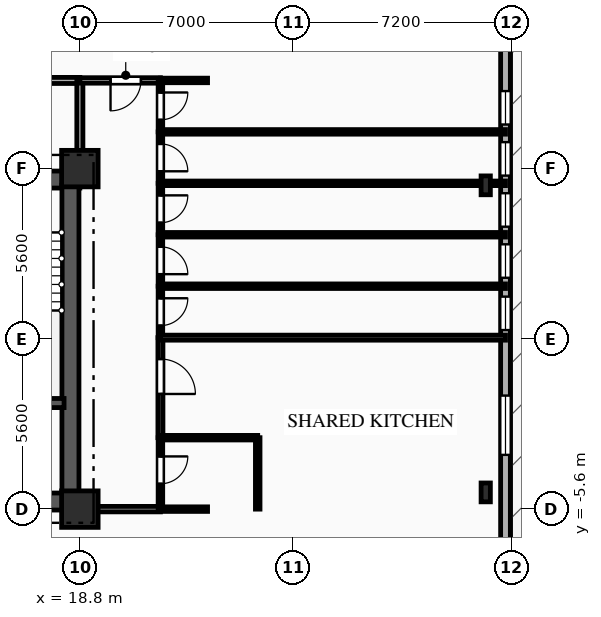
"""IFC4 building model, lengths in metres.
Left out: names, types, materials, properties, quantities, classifications, styles, units other than length and angle.
Written with IfcOpenShell. Run it as: python <this file> out.ifc"""

import sys

from ifc_helpers import new_model, si_unit, direction, frame, frame_2d, origin, origin_2d, place, context, subcontext, project, spatial, rectangle, i_section, extrude, element, fill, save


model = new_model("IFC4")
c1 = context("Model", 3, precision=1e-05, world=origin(), true_north=direction((0.0, 1.0)))
c2 = subcontext(c1, "Body", "Model", "MODEL_VIEW")
j1 = project(units=[si_unit("LENGTHUNIT", "METRE"), si_unit("PLANEANGLEUNIT", "RADIAN")], contexts=[c1])
p1 = place(None, origin())
s1 = spatial("IfcSite", under=j1, at=p1, CompositionType="ELEMENT")
p2 = place(p1, origin())
s2 = spatial("IfcBuilding", under=s1, at=p2, CompositionType="ELEMENT")
p3 = place(p2, frame((0.0, 0.0, 27.0)))
s3 = spatial("IfcBuildingStorey", under=s2, at=p3, CompositionType="ELEMENT", Elevation=27.0)
for number, where, z_axis, x_axis in (
    (1, (18.8, -5.6, 0.0), (0.0, 0.0, 1.0), (1.0, 0.0, 0.0)),
    (2, (18.8, 5.6, 0.0), (0.0, 0.0, 1.0), (1.0, 0.0, 0.0)),
):
    element("IfcColumn", number, at=place(p3, frame(where, z_axis=z_axis, x_axis=x_axis)), inside=s3, PredefinedType="COLUMN", context=c2, shape_type="SweptSolid", body=[
        extrude(rectangle(XDim=1.2, YDim=1.2, at=origin_2d()), origin(), (0.0, 0.0, 1.0), 3.35),
    ])
for number, where, z_axis, x_axis in (
    (3, (32.15, -5.05, 0.0), (0.0, 0.0, 1.0), (1.0, 0.0, 0.0)),
    (4, (32.15, 5.05, 0.0), (0.0, 0.0, 1.0), (1.0, 0.0, 0.0)),
):
    element("IfcColumn", number, at=place(p3, frame(where, z_axis=z_axis, x_axis=x_axis)), inside=s3, PredefinedType="COLUMN", context=c2, shape_type="SweptSolid", body=[
        extrude(i_section(OverallWidth=0.305, OverallDepth=0.62, WebThickness=0.021, FlangeThickness=0.04, FilletRadius=0.027, at=origin_2d()), origin(), (0.0, 0.0, 1.0), 3.35),
    ])
p4 = place(p3, frame((32.8, 15.8, 0.0), z_axis=(0.0, 0.0, 1.0), x_axis=(0.0, -1.0, 0.0)))
e5 = element("IfcWall", 5, at=p4, inside=s3, PredefinedType="SOLIDWALL", context=c2, shape_type="SweptSolid", body=[
    extrude(rectangle(XDim=31.6, YDim=0.32, at=frame_2d((15.8, 0.0))), origin(), (0.0, 0.0, 1.0), 3.035),
])
p5 = place(p4, frame((7.65, 0.0, 0.85)))
e6 = element("IfcOpeningElement", 6, at=p5, cuts=e5, PredefinedType="OPENING", context=c2, shape_type="SweptSolid", body=[
    extrude(rectangle(XDim=1.1, YDim=1.85, at=frame_2d((0.55, 0.925))), frame((0.0, 0.17, 0.0), z_axis=(0.0, -1.0, 0.0), x_axis=(1.0, 0.0, 0.0)), (0.0, 0.0, 1.0), 0.34),
])
p6 = place(p4, frame((9.33, 0.0, 0.85)))
e7 = element("IfcOpeningElement", 7, at=p6, cuts=e5, PredefinedType="OPENING", context=c2, shape_type="SweptSolid", body=[
    extrude(rectangle(XDim=1.1, YDim=1.85, at=frame_2d((0.55, 0.925))), frame((0.0, 0.17, 0.0), z_axis=(0.0, -1.0, 0.0), x_axis=(1.0, 0.0, 0.0)), (0.0, 0.0, 1.0), 0.34),
])
p7 = place(p4, frame((11.01, 0.0, 0.85)))
e8 = element("IfcOpeningElement", 8, at=p7, cuts=e5, PredefinedType="OPENING", context=c2, shape_type="SweptSolid", body=[
    extrude(rectangle(XDim=1.1, YDim=1.85, at=frame_2d((0.55, 0.925))), frame((0.0, 0.17, 0.0), z_axis=(0.0, -1.0, 0.0), x_axis=(1.0, 0.0, 0.0)), (0.0, 0.0, 1.0), 0.34),
])
p8 = place(p4, frame((12.69, 0.0, 0.85)))
e9 = element("IfcOpeningElement", 9, at=p8, cuts=e5, PredefinedType="OPENING", context=c2, shape_type="SweptSolid", body=[
    extrude(rectangle(XDim=1.1, YDim=1.85, at=frame_2d((0.55, 0.925))), frame((0.0, 0.17, 0.0), z_axis=(0.0, -1.0, 0.0), x_axis=(1.0, 0.0, 0.0)), (0.0, 0.0, 1.0), 0.34),
])
p9 = place(p4, frame((14.41, 0.0, 0.85)))
e10 = element("IfcOpeningElement", 10, at=p9, cuts=e5, PredefinedType="OPENING", context=c2, shape_type="SweptSolid", body=[
    extrude(rectangle(XDim=1.1, YDim=1.85, at=frame_2d((0.55, 0.925))), frame((0.0, 0.17, 0.0), z_axis=(0.0, -1.0, 0.0), x_axis=(1.0, 0.0, 0.0)), (0.0, 0.0, 1.0), 0.34),
])
p10 = place(p4, frame((17.665, 0.0, 0.85)))
e11 = element("IfcOpeningElement", 11, at=p10, cuts=e5, PredefinedType="OPENING", context=c2, shape_type="SweptSolid", body=[
    extrude(rectangle(XDim=1.95, YDim=1.85, at=frame_2d((0.975, 0.925))), frame((0.0, 0.17, 0.0), z_axis=(0.0, -1.0, 0.0), x_axis=(1.0, 0.0, 0.0)), (0.0, 0.0, 1.0), 0.34),
])
p11 = place(p3, frame((9.2, 5.24, 0.0), z_axis=(0.0, 0.0, 1.0), x_axis=(1.0, 0.0, 0.0)))
e12 = element("IfcWall", 12, at=p11, inside=s3, PredefinedType="SHEAR", context=c2, shape_type="SweptSolid", body=[
    extrude(rectangle(XDim=9.6, YDim=0.56, at=frame_2d((4.8, 0.0))), origin(), (0.0, 0.0, 1.0), 3.035),
])
p12 = place(p11, frame((6.95, 0.0, 0.0)))
e13 = element("IfcOpeningElement", 13, at=p12, cuts=e12, PredefinedType="OPENING", context=c2, shape_type="SweptSolid", body=[
    extrude(rectangle(XDim=1.1, YDim=2.15, at=frame_2d((0.55, 1.075))), frame((0.0, 0.29, 0.0), z_axis=(0.0, -1.0, 0.0), x_axis=(1.0, 0.0, 0.0)), (0.0, 0.0, 1.0), 0.58),
])
p13 = place(p11, frame((3.775, 0.0, 0.0)))
e14 = element("IfcOpeningElement", 14, at=p13, cuts=e12, PredefinedType="OPENING", context=c2, shape_type="SweptSolid", body=[
    extrude(rectangle(XDim=1.05, YDim=2.1, at=frame_2d((0.525, 1.05))), frame((0.0, 0.29, 0.0), z_axis=(0.0, -1.0, 0.0), x_axis=(1.0, 0.0, 0.0)), (0.0, 0.0, 1.0), 0.58),
])
p14 = place(p3, frame((9.2, -5.35, 0.0), z_axis=(0.0, 0.0, 1.0), x_axis=(1.0, 0.0, 0.0)))
e15 = element("IfcWall", 15, at=p14, inside=s3, PredefinedType="SHEAR", context=c2, shape_type="SweptSolid", body=[
    extrude(rectangle(XDim=9.6, YDim=0.56, at=frame_2d((4.8, 0.0))), origin(), (0.0, 0.0, 1.0), 3.035),
])
p15 = place(p14, frame((7.65, 0.0, 0.0)))
e16 = element("IfcOpeningElement", 16, at=p15, cuts=e15, PredefinedType="OPENING", context=c2, shape_type="SweptSolid", body=[
    extrude(rectangle(XDim=0.9, YDim=2.1, at=frame_2d((0.45, 1.05))), frame((0.0, 0.29, 0.0), z_axis=(0.0, -1.0, 0.0), x_axis=(1.0, 0.0, 0.0)), (0.0, 0.0, 1.0), 0.58),
])
p16 = place(p3, frame((18.49, -5.05, 0.0), z_axis=(0.0, 0.0, 1.0), x_axis=(0.0, 1.0, 0.0)))
e17 = element("IfcWall", 17, at=p16, inside=s3, PredefinedType="SHEAR", context=c2, shape_type="SweptSolid", body=[
    extrude(rectangle(XDim=10.1, YDim=0.56, at=frame_2d((5.05, 0.0))), origin(), (0.0, 0.0, 1.0), 3.035),
])
p17 = place(p3, frame((15.1, -2.11, 0.0), z_axis=(0.0, 0.0, 1.0), x_axis=(1.0, 0.0, 0.0)))
e18 = element("IfcWall", 18, at=p17, inside=s3, PredefinedType="SHEAR", context=c2, shape_type="SweptSolid", body=[
    extrude(rectangle(XDim=3.18, YDim=0.3, at=frame_2d((1.59, 0.0))), origin(), (0.0, 0.0, 1.0), 3.035),
])
p18 = place(p3, frame((18.8, 8.5, 0.0), z_axis=(0.0, 0.0, 1.0), x_axis=(-1.0, 0.0, 0.0)))
e19 = element("IfcWall", 19, at=p18, inside=s3, PredefinedType="PARTITIONING", context=c2, shape_type="SweptSolid", body=[
    extrude(rectangle(XDim=6.8, YDim=0.2, at=frame_2d((3.4, 0.0))), origin(), (0.0, 0.0, 1.0), 3.035),
])
p19 = place(p18, frame((3.985, 0.0, 0.0)))
e20 = element("IfcOpeningElement", 20, at=p19, cuts=e19, PredefinedType="OPENING", context=c2, shape_type="SweptSolid", body=[
    extrude(rectangle(XDim=1.1, YDim=2.15, at=frame_2d((0.55, 1.075))), frame((0.0, 0.11, 0.0), z_axis=(0.0, -1.0, 0.0), x_axis=(1.0, 0.0, 0.0)), (0.0, 0.0, 1.0), 0.22),
])
p20 = place(p3, frame((18.8, 5.6, 0.0), z_axis=(0.0, 0.0, 1.0), x_axis=(0.0, 1.0, 0.0)))
e21 = element("IfcWall", 21, at=p20, inside=s3, PredefinedType="PARTITIONING", context=c2, shape_type="SweptSolid", body=[
    extrude(rectangle(XDim=2.9, YDim=0.2, at=frame_2d((1.45, 0.0))), origin(), (0.0, 0.0, 1.0), 2.52),
])
p21 = place(p3, frame((21.45, 8.5, 0.0), z_axis=(0.0, 0.0, 1.0), x_axis=(-1.0, 0.0, 0.0)))
e22 = element("IfcWall", 22, at=p21, inside=s3, PredefinedType="PARTITIONING", context=c2, shape_type="SweptSolid", body=[
    extrude(rectangle(XDim=2.65, YDim=0.18, at=frame_2d((1.325, 0.0))), origin(), (0.0, 0.0, 1.0), 3.035),
])
p22 = place(p21, frame((0.641, 0.0, 0.0)))
e23 = element("IfcOpeningElement", 23, at=p22, cuts=e22, PredefinedType="OPENING", context=c2, shape_type="SweptSolid", body=[
    extrude(rectangle(XDim=1.0, YDim=2.15, at=frame_2d((0.5, 1.075))), frame((0.0, 0.1, 0.0), z_axis=(0.0, -1.0, 0.0), x_axis=(1.0, 0.0, 0.0)), (0.0, 0.0, 1.0), 0.2),
])
p23 = place(p3, frame((23.0, 8.5, 0.0), z_axis=(0.0, 0.0, 1.0), x_axis=(-1.0, 0.0, 0.0)))
e24 = element("IfcWall", 24, at=p23, inside=s3, PredefinedType="PARTITIONING", context=c2, shape_type="SweptSolid", body=[
    extrude(rectangle(XDim=1.55, YDim=0.15, at=frame_2d((0.775, 0.0))), origin(), (0.0, 0.0, 1.0), 3.035),
])
p24 = place(p3, frame((18.8, -5.6, 0.0), z_axis=(0.0, 0.0, 1.0), x_axis=(1.0, 0.0, 0.0)))
e25 = element("IfcWall", 25, at=p24, inside=s3, PredefinedType="PARTITIONING", context=c2, shape_type="SweptSolid", body=[
    extrude(rectangle(XDim=2.65, YDim=0.18, at=frame_2d((1.325, 0.0))), origin(), (0.0, 0.0, 1.0), 3.035),
])
p25 = place(p3, frame((21.45, -5.6, 0.0), z_axis=(0.0, 0.0, 1.0), x_axis=(1.0, 0.0, 0.0)))
e26 = element("IfcWall", 26, at=p25, inside=s3, PredefinedType="PLUMBINGWALL", context=c2, shape_type="SweptSolid", body=[
    extrude(rectangle(XDim=1.55, YDim=0.15, at=frame_2d((0.775, 0.0))), origin(), (0.0, 0.0, 1.0), 3.035),
])
p26 = place(p3, frame((21.45, -3.25, 0.0), z_axis=(0.0, 0.0, 1.0), x_axis=(0.0, -1.0, 0.0)))
e27 = element("IfcWall", 27, at=p26, inside=s3, PredefinedType="PLUMBINGWALL", context=c2, shape_type="SweptSolid", body=[
    extrude(rectangle(XDim=2.35, YDim=0.15, at=frame_2d((1.175, 0.0))), origin(), (0.0, 0.0, 1.0), 3.035),
])
p27 = place(p26, frame((0.616, 0.0, 0.0)))
e28 = element("IfcOpeningElement", 28, at=p27, cuts=e27, PredefinedType="OPENING", context=c2, shape_type="SweptSolid", body=[
    extrude(rectangle(XDim=0.9, YDim=2.1, at=frame_2d((0.45, 1.05))), frame((0.0, 0.085, 0.0), z_axis=(0.0, -1.0, 0.0), x_axis=(1.0, 0.0, 0.0)), (0.0, 0.0, 1.0), 0.17),
])
p28 = place(p3, frame((21.45, 0.04, 0.0), z_axis=(0.0, 0.0, 1.0), x_axis=(0.0, -1.0, 0.0)))
e29 = element("IfcWall", 29, at=p28, inside=s3, PredefinedType="PARTITIONING", context=c2, shape_type="SweptSolid", body=[
    extrude(rectangle(XDim=3.29, YDim=0.165, at=frame_2d((1.645, 0.0))), origin(), (0.0, 0.0, 1.0), 3.035),
])
p29 = place(p28, frame((0.702, 0.0, 0.0)))
e30 = element("IfcOpeningElement", 30, at=p29, cuts=e29, PredefinedType="OPENING", context=c2, shape_type="SweptSolid", body=[
    extrude(rectangle(XDim=1.15, YDim=2.15, at=frame_2d((0.575, 1.075))), frame((0.0, 0.093, 0.0), z_axis=(0.0, -1.0, 0.0), x_axis=(1.0, 0.0, 0.0)), (0.0, 0.0, 1.0), 0.185),
])
p30 = place(p3, frame((21.45, 1.732, 0.0), z_axis=(0.0, 0.0, 1.0), x_axis=(0.0, -1.0, 0.0)))
e31 = element("IfcWall", 31, at=p30, inside=s3, PredefinedType="PARTITIONING", context=c2, shape_type="SweptSolid", body=[
    extrude(rectangle(XDim=1.692, YDim=0.15, at=frame_2d((0.846, 0.0))), origin(), (0.0, 0.0, 1.0), 3.035),
])
p31 = place(p30, frame((0.396, 0.0, 0.0)))
e32 = element("IfcOpeningElement", 32, at=p31, cuts=e31, PredefinedType="OPENING", context=c2, shape_type="SweptSolid", body=[
    extrude(rectangle(XDim=0.9, YDim=2.1, at=frame_2d((0.45, 1.05))), frame((0.0, 0.085, 0.0), z_axis=(0.0, -1.0, 0.0), x_axis=(1.0, 0.0, 0.0)), (0.0, 0.0, 1.0), 0.17),
])
p32 = place(p3, frame((21.45, 3.424, 0.0), z_axis=(0.0, 0.0, 1.0), x_axis=(0.0, -1.0, 0.0)))
e33 = element("IfcWall", 33, at=p32, inside=s3, PredefinedType="PARTITIONING", context=c2, shape_type="SweptSolid", body=[
    extrude(rectangle(XDim=1.692, YDim=0.15, at=frame_2d((0.846, 0.0))), origin(), (0.0, 0.0, 1.0), 3.035),
])
p33 = place(p32, frame((0.396, 0.0, 0.0)))
e34 = element("IfcOpeningElement", 34, at=p33, cuts=e33, PredefinedType="OPENING", context=c2, shape_type="SweptSolid", body=[
    extrude(rectangle(XDim=0.9, YDim=2.1, at=frame_2d((0.45, 1.05))), frame((0.0, 0.085, 0.0), z_axis=(0.0, -1.0, 0.0), x_axis=(1.0, 0.0, 0.0)), (0.0, 0.0, 1.0), 0.17),
])
p34 = place(p3, frame((21.45, 5.116, 0.0), z_axis=(0.0, 0.0, 1.0), x_axis=(0.0, -1.0, 0.0)))
e35 = element("IfcWall", 35, at=p34, inside=s3, PredefinedType="PARTITIONING", context=c2, shape_type="SweptSolid", body=[
    extrude(rectangle(XDim=1.692, YDim=0.15, at=frame_2d((0.846, 0.0))), origin(), (0.0, 0.0, 1.0), 3.035),
])
p35 = place(p34, frame((0.396, 0.0, 0.0)))
e36 = element("IfcOpeningElement", 36, at=p35, cuts=e35, PredefinedType="OPENING", context=c2, shape_type="SweptSolid", body=[
    extrude(rectangle(XDim=0.9, YDim=2.1, at=frame_2d((0.45, 1.05))), frame((0.0, 0.085, 0.0), z_axis=(0.0, -1.0, 0.0), x_axis=(1.0, 0.0, 0.0)), (0.0, 0.0, 1.0), 0.17),
])
p36 = place(p3, frame((21.45, 6.808, 0.0), z_axis=(0.0, 0.0, 1.0), x_axis=(0.0, -1.0, 0.0)))
e37 = element("IfcWall", 37, at=p36, inside=s3, PredefinedType="PARTITIONING", context=c2, shape_type="SweptSolid", body=[
    extrude(rectangle(XDim=1.692, YDim=0.15, at=frame_2d((0.846, 0.0))), origin(), (0.0, 0.0, 1.0), 3.035),
])
p37 = place(p36, frame((0.396, 0.0, 0.0)))
e38 = element("IfcOpeningElement", 38, at=p37, cuts=e37, PredefinedType="OPENING", context=c2, shape_type="SweptSolid", body=[
    extrude(rectangle(XDim=0.9, YDim=2.1, at=frame_2d((0.45, 1.05))), frame((0.0, 0.085, 0.0), z_axis=(0.0, -1.0, 0.0), x_axis=(1.0, 0.0, 0.0)), (0.0, 0.0, 1.0), 0.17),
])
p38 = place(p3, frame((21.45, 8.5, 0.0), z_axis=(0.0, 0.0, 1.0), x_axis=(0.0, -1.0, 0.0)))
e39 = element("IfcWall", 39, at=p38, inside=s3, PredefinedType="PARTITIONING", context=c2, shape_type="SweptSolid", body=[
    extrude(rectangle(XDim=1.692, YDim=0.15, at=frame_2d((0.846, 0.0))), origin(), (0.0, 0.0, 1.0), 3.035),
])
p39 = place(p38, frame((0.396, 0.0, 0.0)))
e40 = element("IfcOpeningElement", 40, at=p39, cuts=e39, PredefinedType="OPENING", context=c2, shape_type="SweptSolid", body=[
    extrude(rectangle(XDim=0.9, YDim=2.1, at=frame_2d((0.45, 1.05))), frame((0.0, 0.085, 0.0), z_axis=(0.0, -1.0, 0.0), x_axis=(1.0, 0.0, 0.0)), (0.0, 0.0, 1.0), 0.17),
])
p40 = place(p3, frame((21.45, -3.25, 0.0), z_axis=(0.0, 0.0, 1.0), x_axis=(1.0, 0.0, 0.0)))
e41 = element("IfcWall", 41, at=p40, inside=s3, PredefinedType="PLUMBINGWALL", context=c2, shape_type="SweptSolid", body=[
    extrude(rectangle(XDim=3.2, YDim=0.15, at=frame_2d((1.6, 0.0))), origin(), (0.0, 0.0, 1.0), 2.52),
])
p41 = place(p3, frame((24.65, -3.25, 0.0), z_axis=(0.0, 0.0, 1.0), x_axis=(0.0, -1.0, 0.0)))
e42 = element("IfcWall", 42, at=p41, inside=s3, PredefinedType="PLUMBINGWALL", context=c2, shape_type="SweptSolid", body=[
    extrude(rectangle(XDim=2.35, YDim=0.15, at=frame_2d((1.175, 0.0))), origin(), (0.0, 0.0, 1.0), 3.035),
])
p42 = place(p3, frame((21.45, 0.04, 0.0), z_axis=(0.0, 0.0, 1.0), x_axis=(1.0, 0.0, 0.0)))
e43 = element("IfcWall", 43, at=p42, inside=s3, PredefinedType="PARTITIONING", context=c2, shape_type="SweptSolid", body=[
    extrude(rectangle(XDim=11.35, YDim=0.165, at=frame_2d((5.675, 0.0))), origin(), (0.0, 0.0, 1.0), 3.035),
])
p43 = place(p3, frame((21.45, 1.732, 0.0), z_axis=(0.0, 0.0, 1.0), x_axis=(1.0, 0.0, 0.0)))
e44 = element("IfcWall", 44, at=p43, inside=s3, PredefinedType="PARTITIONING", context=c2, shape_type="SweptSolid", body=[
    extrude(rectangle(XDim=11.35, YDim=0.15, at=frame_2d((5.675, 0.0))), origin(), (0.0, 0.0, 1.0), 3.035),
])
for number, where, z_axis, x_axis in (
    (45, (21.45, 3.424, 0.0), (0.0, 0.0, 1.0), (1.0, 0.0, 0.0)),
    (46, (21.45, 5.116, 0.0), (0.0, 0.0, 1.0), (1.0, 0.0, 0.0)),
):
    element("IfcWall", number, at=place(p3, frame(where, z_axis=z_axis, x_axis=x_axis)), inside=s3, PredefinedType="PARTITIONING", context=c2, shape_type="SweptSolid", body=[
        extrude(rectangle(XDim=11.35, YDim=0.15, at=frame_2d((5.675, 0.0))), origin(), (0.0, 0.0, 1.0), 2.52),
    ])
p44 = place(p3, frame((21.45, 6.808, 0.0), z_axis=(0.0, 0.0, 1.0), x_axis=(1.0, 0.0, 0.0)))
e47 = element("IfcWall", 47, at=p44, inside=s3, PredefinedType="PARTITIONING", context=c2, shape_type="SweptSolid", body=[
    extrude(rectangle(XDim=11.35, YDim=0.15, at=frame_2d((5.675, 0.0))), origin(), (0.0, 0.0, 1.0), 3.035),
])
p45 = place(p5, origin())
e48 = element("IfcWindow", 48, at=p45, inside=s3, PartitioningType="SINGLE_PANEL", PredefinedType="WINDOW", context=c2, shape_type="SweptSolid", body=[
    extrude(rectangle(XDim=1.1, YDim=1.85, at=frame_2d((0.55, 0.925))), frame((0.0, 0.03, 0.0), z_axis=(0.0, -1.0, 0.0), x_axis=(1.0, 0.0, 0.0)), (0.0, 0.0, 1.0), 0.06),
])
fill(e6, e48)
p46 = place(p6, origin())
e49 = element("IfcWindow", 49, at=p46, inside=s3, PartitioningType="SINGLE_PANEL", PredefinedType="WINDOW", context=c2, shape_type="SweptSolid", body=[
    extrude(rectangle(XDim=1.1, YDim=1.85, at=frame_2d((0.55, 0.925))), frame((0.0, 0.03, 0.0), z_axis=(0.0, -1.0, 0.0), x_axis=(1.0, 0.0, 0.0)), (0.0, 0.0, 1.0), 0.06),
])
fill(e7, e49)
p47 = place(p7, origin())
e50 = element("IfcWindow", 50, at=p47, inside=s3, PartitioningType="SINGLE_PANEL", PredefinedType="WINDOW", context=c2, shape_type="SweptSolid", body=[
    extrude(rectangle(XDim=1.1, YDim=1.85, at=frame_2d((0.55, 0.925))), frame((0.0, 0.03, 0.0), z_axis=(0.0, -1.0, 0.0), x_axis=(1.0, 0.0, 0.0)), (0.0, 0.0, 1.0), 0.06),
])
fill(e8, e50)
p48 = place(p8, origin())
e51 = element("IfcWindow", 51, at=p48, inside=s3, PartitioningType="SINGLE_PANEL", PredefinedType="WINDOW", context=c2, shape_type="SweptSolid", body=[
    extrude(rectangle(XDim=1.1, YDim=1.85, at=frame_2d((0.55, 0.925))), frame((0.0, 0.03, 0.0), z_axis=(0.0, -1.0, 0.0), x_axis=(1.0, 0.0, 0.0)), (0.0, 0.0, 1.0), 0.06),
])
fill(e9, e51)
p49 = place(p9, origin())
e52 = element("IfcWindow", 52, at=p49, inside=s3, PartitioningType="SINGLE_PANEL", PredefinedType="WINDOW", context=c2, shape_type="SweptSolid", body=[
    extrude(rectangle(XDim=1.1, YDim=1.85, at=frame_2d((0.55, 0.925))), frame((0.0, 0.03, 0.0), z_axis=(0.0, -1.0, 0.0), x_axis=(1.0, 0.0, 0.0)), (0.0, 0.0, 1.0), 0.06),
])
fill(e10, e52)
p50 = place(p10, origin())
e53 = element("IfcWindow", 53, at=p50, inside=s3, PartitioningType="SINGLE_PANEL", PredefinedType="WINDOW", context=c2, shape_type="SweptSolid", body=[
    extrude(rectangle(XDim=1.95, YDim=1.85, at=frame_2d((0.975, 0.925))), frame((0.0, 0.03, 0.0), z_axis=(0.0, -1.0, 0.0), x_axis=(1.0, 0.0, 0.0)), (0.0, 0.0, 1.0), 0.06),
])
fill(e11, e53)
p51 = place(p22, origin())
e54 = element("IfcDoor", 54, at=p51, inside=s3, OperationType="SINGLE_SWING_RIGHT", PredefinedType="DOOR", context=c2, shape_type="SweptSolid", body=[
    extrude(rectangle(XDim=1.0, YDim=2.15, at=frame_2d((0.5, 1.075))), frame((0.0, 0.025, 0.0), z_axis=(0.0, -1.0, 0.0), x_axis=(1.0, 0.0, 0.0)), (0.0, 0.0, 1.0), 0.05),
])
fill(e23, e54)
p52 = place(p27, origin())
e55 = element("IfcDoor", 55, at=p52, inside=s3, OperationType="SINGLE_SWING_LEFT", PredefinedType="DOOR", context=c2, shape_type="SweptSolid", body=[
    extrude(rectangle(XDim=0.9, YDim=2.1, at=frame_2d((0.45, 1.05))), frame((0.0, 0.025, 0.0), z_axis=(0.0, -1.0, 0.0), x_axis=(1.0, 0.0, 0.0)), (0.0, 0.0, 1.0), 0.05),
])
fill(e28, e55)
p53 = place(p29, origin())
e56 = element("IfcDoor", 56, at=p53, inside=s3, OperationType="SINGLE_SWING_RIGHT", PredefinedType="DOOR", context=c2, shape_type="SweptSolid", body=[
    extrude(rectangle(XDim=1.15, YDim=2.15, at=frame_2d((0.575, 1.075))), frame((0.0, 0.025, 0.0), z_axis=(0.0, -1.0, 0.0), x_axis=(1.0, 0.0, 0.0)), (0.0, 0.0, 1.0), 0.05),
])
fill(e30, e56)
p54 = place(p31, origin())
e57 = element("IfcDoor", 57, at=p54, inside=s3, OperationType="SINGLE_SWING_LEFT", PredefinedType="DOOR", context=c2, shape_type="SweptSolid", body=[
    extrude(rectangle(XDim=0.9, YDim=2.1, at=frame_2d((0.45, 1.05))), frame((0.0, 0.025, 0.0), z_axis=(0.0, -1.0, 0.0), x_axis=(1.0, 0.0, 0.0)), (0.0, 0.0, 1.0), 0.05),
])
fill(e32, e57)
p55 = place(p33, origin())
e58 = element("IfcDoor", 58, at=p55, inside=s3, OperationType="SINGLE_SWING_RIGHT", PredefinedType="DOOR", context=c2, shape_type="SweptSolid", body=[
    extrude(rectangle(XDim=0.9, YDim=2.1, at=frame_2d((0.45, 1.05))), frame((0.0, 0.025, 0.0), z_axis=(0.0, -1.0, 0.0), x_axis=(1.0, 0.0, 0.0)), (0.0, 0.0, 1.0), 0.05),
])
fill(e34, e58)
p56 = place(p35, origin())
e59 = element("IfcDoor", 59, at=p56, inside=s3, OperationType="SINGLE_SWING_LEFT", PredefinedType="DOOR", context=c2, shape_type="SweptSolid", body=[
    extrude(rectangle(XDim=0.9, YDim=2.1, at=frame_2d((0.45, 1.05))), frame((0.0, 0.025, 0.0), z_axis=(0.0, -1.0, 0.0), x_axis=(1.0, 0.0, 0.0)), (0.0, 0.0, 1.0), 0.05),
])
fill(e36, e59)
p57 = place(p37, origin())
e60 = element("IfcDoor", 60, at=p57, inside=s3, OperationType="SINGLE_SWING_RIGHT", PredefinedType="DOOR", context=c2, shape_type="SweptSolid", body=[
    extrude(rectangle(XDim=0.9, YDim=2.1, at=frame_2d((0.45, 1.05))), frame((0.0, 0.025, 0.0), z_axis=(0.0, -1.0, 0.0), x_axis=(1.0, 0.0, 0.0)), (0.0, 0.0, 1.0), 0.05),
])
fill(e38, e60)
p58 = place(p39, origin())
e61 = element("IfcDoor", 61, at=p58, inside=s3, OperationType="SINGLE_SWING_LEFT", PredefinedType="DOOR", context=c2, shape_type="SweptSolid", body=[
    extrude(rectangle(XDim=0.9, YDim=2.1, at=frame_2d((0.45, 1.05))), frame((0.0, 0.025, 0.0), z_axis=(0.0, -1.0, 0.0), x_axis=(1.0, 0.0, 0.0)), (0.0, 0.0, 1.0), 0.05),
])
fill(e40, e61)
save(model, sys.argv[1])
